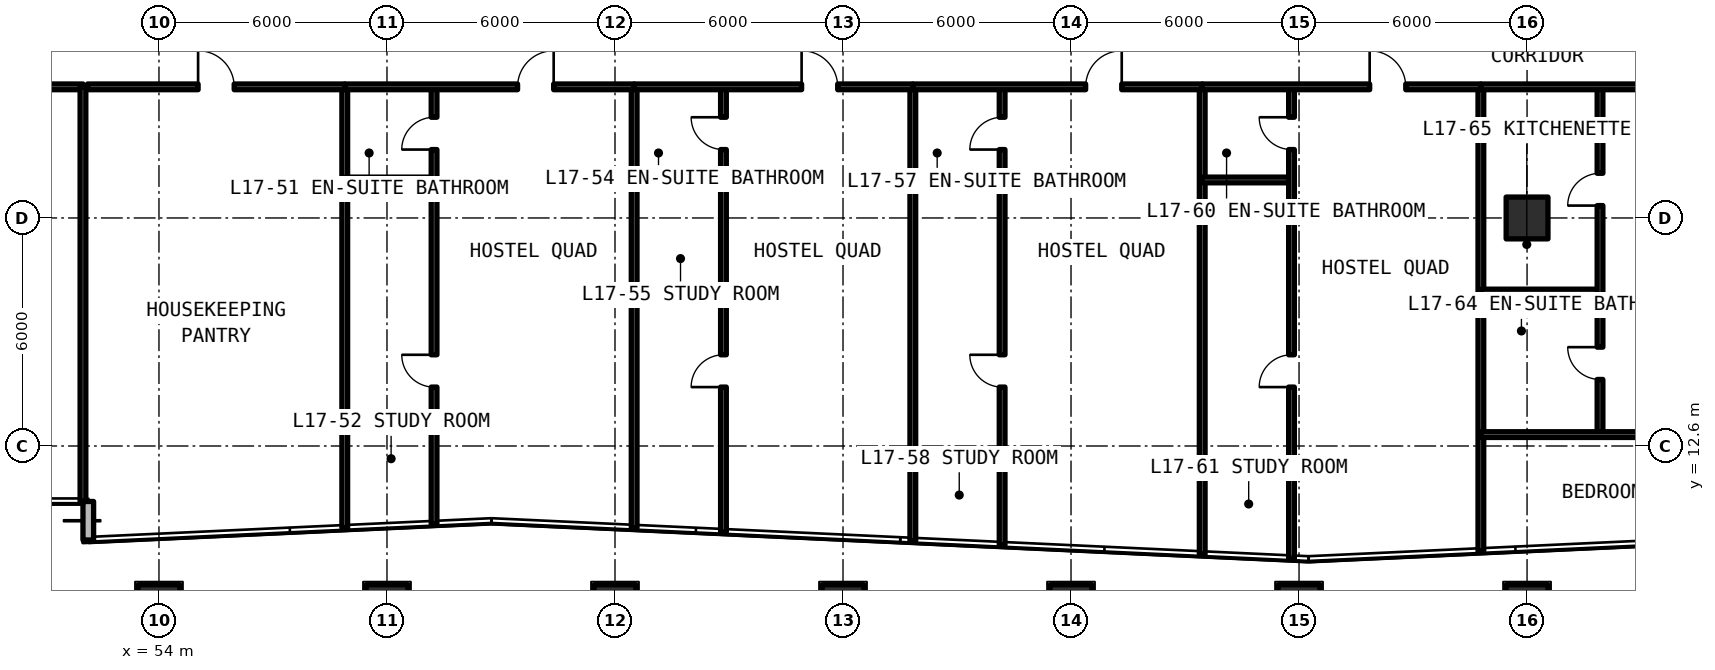
"""IFC4 building model, lengths in metres.
Left out: names, types, materials, properties, quantities, classifications, styles, units other than length and angle.
Written with IfcOpenShell. Run it as: python <this file> out.ifc"""

import sys

from ifc_helpers import new_model, si_unit, direction, frame, frame_2d, origin, origin_2d, place, context, subcontext, project, spatial, rectangle, extrude, element, fill, save


model = new_model("IFC4")
c1 = context("Model", 3, precision=1e-05, world=origin(), true_north=direction((0.0, 1.0)))
c2 = subcontext(c1, "Body", "Model", "MODEL_VIEW")
j1 = project(units=[si_unit("LENGTHUNIT", "METRE"), si_unit("PLANEANGLEUNIT", "RADIAN")], contexts=[c1])
p1 = place(None, origin())
s1 = spatial("IfcSite", under=j1, at=p1, CompositionType="ELEMENT")
p2 = place(p1, origin())
s2 = spatial("IfcBuilding", under=s1, at=p2, CompositionType="ELEMENT")
p3 = place(p2, frame((0.0, 0.0, 62.37)))
s3 = spatial("IfcBuildingStorey", under=s2, at=p3, CompositionType="ELEMENT", Elevation=62.37)
for number, where, z_axis, x_axis in (
    (1, (90.0, 18.6, 0.0), (0.0, 0.0, 1.0), (1.0, 0.0, 0.0)),
    (2, (54.0, 8.4, 0.0), (0.0, 0.0, 1.0), (1.0, 0.0, 0.0)),
    (3, (60.0, 8.4, 0.0), (0.0, 0.0, 1.0), (1.0, 0.0, 0.0)),
    (4, (66.0, 8.4, 0.0), (0.0, 0.0, 1.0), (1.0, 0.0, 0.0)),
    (5, (72.0, 8.4, 0.0), (0.0, 0.0, 1.0), (1.0, 0.0, 0.0)),
    (6, (78.0, 8.4, 0.0), (0.0, 0.0, 1.0), (1.0, 0.0, 0.0)),
    (7, (84.0, 8.4, 0.0), (0.0, 0.0, 1.0), (1.0, 0.0, 0.0)),
    (8, (90.0, 8.4, 0.0), (0.0, 0.0, 1.0), (1.0, 0.0, 0.0)),
):
    element("IfcColumn", number, at=place(p3, frame(where, z_axis=z_axis, x_axis=x_axis)), inside=s3, PredefinedType="COLUMN", context=c2, shape_type="SweptSolid", body=[
        extrude(rectangle(XDim=1.1, YDim=1.1, at=origin_2d()), origin(), (0.0, 0.0, 1.0), 3.63),
    ])
p4 = place(p3, frame((52.14, 11.14, 0.0), z_axis=(0.0, 0.0, 1.0), x_axis=(0.0, -1.0, 0.0)))
e9 = element("IfcWall", 9, at=p4, inside=s3, PredefinedType="SOLIDWALL", context=c2, shape_type="SweptSolid", body=[
    extrude(rectangle(XDim=1.013, YDim=0.28, at=frame_2d((0.507, 0.0))), origin(), (0.0, 0.0, 1.0), 3.41),
])
p5 = place(p3, frame((43.6, 22.05, 0.0), z_axis=(0.0, 0.0, 1.0), x_axis=(1.0, 0.0, 0.0)))
e10 = element("IfcWall", 10, at=p5, inside=s3, PredefinedType="SOLIDWALL", context=c2, shape_type="SweptSolid", body=[
    extrude(rectangle(XDim=8.4, YDim=0.15, at=frame_2d((4.2, 0.0))), origin(), (0.0, 0.0, 1.0), 2.63),
])
p6 = place(p5, frame((3.65, 0.0, 0.0)))
e11 = element("IfcOpeningElement", 11, at=p6, cuts=e10, PredefinedType="OPENING", context=c2, shape_type="SweptSolid", body=[
    extrude(rectangle(XDim=1.1, YDim=2.15, at=frame_2d((0.55, 1.075))), frame((0.0, 0.085, 0.0), z_axis=(0.0, -1.0, 0.0), x_axis=(1.0, 0.0, 0.0)), (0.0, 0.0, 1.0), 0.17),
])
p7 = place(p3, frame((52.0, 11.14, 0.0), z_axis=(0.0, 0.0, 1.0), x_axis=(0.0, 1.0, 0.0)))
e12 = element("IfcWall", 12, at=p7, inside=s3, PredefinedType="SOLIDWALL", context=c2, shape_type="SweptSolid", body=[
    extrude(rectangle(XDim=10.91, YDim=0.15, at=frame_2d((5.455, 0.0))), origin(), (0.0, 0.0, 1.0), 2.63),
])
p8 = place(p3, frame((58.889, 10.441, 0.0), z_axis=(0.0, 0.0, 1.0), x_axis=(0.0, 1.0, 0.0)))
e13 = element("IfcWall", 13, at=p8, inside=s3, PredefinedType="SOLIDWALL", context=c2, shape_type="SweptSolid", body=[
    extrude(rectangle(XDim=11.609, YDim=0.15, at=frame_2d((5.805, 0.0))), origin(), (0.0, 0.0, 1.0), 2.63),
])
p9 = place(p3, frame((52.12, 22.05, 0.0), z_axis=(0.0, 0.0, 1.0), x_axis=(1.0, 0.0, 0.0)))
e14 = element("IfcWall", 14, at=p9, inside=s3, PredefinedType="SOLIDWALL", context=c2, shape_type="SweptSolid", body=[
    extrude(rectangle(XDim=6.769, YDim=0.15, at=frame_2d((3.384, 0.0))), origin(), (0.0, 0.0, 1.0), 2.63),
])
p10 = place(p9, frame((2.909, 0.0, 0.0)))
e15 = element("IfcOpeningElement", 15, at=p10, cuts=e14, PredefinedType="OPENING", context=c2, shape_type="SweptSolid", body=[
    extrude(rectangle(XDim=0.95, YDim=2.15, at=frame_2d((0.475, 1.075))), frame((0.0, 0.085, 0.0), z_axis=(0.0, -1.0, 0.0), x_axis=(1.0, 0.0, 0.0)), (0.0, 0.0, 1.0), 0.17),
])
p11 = place(p3, frame((66.504, 10.446, 0.0), z_axis=(0.0, 0.0, 1.0), x_axis=(0.0, 1.0, 0.0)))
e16 = element("IfcWall", 16, at=p11, inside=s3, PredefinedType="SOLIDWALL", context=c2, shape_type="SweptSolid", body=[
    extrude(rectangle(XDim=11.604, YDim=0.15, at=frame_2d((5.802, 0.0))), origin(), (0.0, 0.0, 1.0), 2.63),
])
p12 = place(p3, frame((58.889, 19.6, 0.0), z_axis=(0.0, 0.0, 1.0), x_axis=(1.0, 0.0, 0.0)))
e17 = element("IfcWall", 17, at=p12, inside=s3, PredefinedType="PARTITIONING", context=c2, shape_type="SweptSolid", body=[
    extrude(rectangle(XDim=2.35, YDim=0.15, at=frame_2d((1.175, 0.0))), origin(), (0.0, 0.0, 1.0), 2.63),
])
p13 = place(p3, frame((61.239, 10.55, 0.0), z_axis=(0.0, 0.0, 1.0), x_axis=(0.0, 1.0, 0.0)))
e18 = element("IfcWall", 18, at=p13, inside=s3, PredefinedType="PARTITIONING", context=c2, shape_type="SweptSolid", body=[
    extrude(rectangle(XDim=11.5, YDim=0.15, at=frame_2d((5.75, 0.0))), origin(), (0.0, 0.0, 1.0), 2.63),
])
p14 = place(p13, frame((3.6, 0.0, 0.0)))
e19 = element("IfcOpeningElement", 19, at=p14, cuts=e18, PredefinedType="OPENING", context=c2, shape_type="SweptSolid", body=[
    extrude(rectangle(XDim=0.85, YDim=2.1, at=frame_2d((0.425, 1.05))), frame((0.0, 0.085, 0.0), z_axis=(0.0, -1.0, 0.0), x_axis=(1.0, 0.0, 0.0)), (0.0, 0.0, 1.0), 0.17),
])
p15 = place(p13, frame((9.85, 0.0, 0.0)))
e20 = element("IfcOpeningElement", 20, at=p15, cuts=e18, PredefinedType="OPENING", context=c2, shape_type="SweptSolid", body=[
    extrude(rectangle(XDim=0.85, YDim=2.1, at=frame_2d((0.425, 1.05))), frame((0.0, 0.085, 0.0), z_axis=(0.0, -1.0, 0.0), x_axis=(1.0, 0.0, 0.0)), (0.0, 0.0, 1.0), 0.17),
])
p16 = place(p3, frame((58.889, 22.05, 0.0), z_axis=(0.0, 0.0, 1.0), x_axis=(1.0, 0.0, 0.0)))
e21 = element("IfcWall", 21, at=p16, inside=s3, PredefinedType="SOLIDWALL", context=c2, shape_type="SweptSolid", body=[
    extrude(rectangle(XDim=7.615, YDim=0.15, at=frame_2d((3.808, 0.0))), origin(), (0.0, 0.0, 1.0), 2.63),
])
p17 = place(p16, frame((4.548, 0.0, 0.0)))
e22 = element("IfcOpeningElement", 22, at=p17, cuts=e21, PredefinedType="OPENING", context=c2, shape_type="SweptSolid", body=[
    extrude(rectangle(XDim=0.95, YDim=2.15, at=frame_2d((0.475, 1.075))), frame((0.0, 0.085, 0.0), z_axis=(0.0, -1.0, 0.0), x_axis=(1.0, 0.0, 0.0)), (0.0, 0.0, 1.0), 0.17),
])
p18 = place(p3, frame((73.837, 10.104, 0.0), z_axis=(0.0, 0.0, 1.0), x_axis=(0.0, 1.0, 0.0)))
e23 = element("IfcWall", 23, at=p18, inside=s3, PredefinedType="SOLIDWALL", context=c2, shape_type="SweptSolid", body=[
    extrude(rectangle(XDim=11.946, YDim=0.15, at=frame_2d((5.973, 0.0))), origin(), (0.0, 0.0, 1.0), 2.63),
])
p19 = place(p3, frame((66.504, 19.6, 0.0), z_axis=(0.0, 0.0, 1.0), x_axis=(1.0, 0.0, 0.0)))
e24 = element("IfcWall", 24, at=p19, inside=s3, PredefinedType="PARTITIONING", context=c2, shape_type="SweptSolid", body=[
    extrude(rectangle(XDim=2.35, YDim=0.15, at=frame_2d((1.175, 0.0))), origin(), (0.0, 0.0, 1.0), 2.63),
])
p20 = place(p3, frame((68.854, 10.336, 0.0), z_axis=(0.0, 0.0, 1.0), x_axis=(0.0, 1.0, 0.0)))
e25 = element("IfcWall", 25, at=p20, inside=s3, PredefinedType="PARTITIONING", context=c2, shape_type="SweptSolid", body=[
    extrude(rectangle(XDim=11.714, YDim=0.15, at=frame_2d((5.857, 0.0))), origin(), (0.0, 0.0, 1.0), 2.63),
])
p21 = place(p20, frame((3.814, 0.0, 0.0)))
e26 = element("IfcOpeningElement", 26, at=p21, cuts=e25, PredefinedType="OPENING", context=c2, shape_type="SweptSolid", body=[
    extrude(rectangle(XDim=0.85, YDim=2.1, at=frame_2d((0.425, 1.05))), frame((0.0, 0.085, 0.0), z_axis=(0.0, -1.0, 0.0), x_axis=(1.0, 0.0, 0.0)), (0.0, 0.0, 1.0), 0.17),
])
p22 = place(p20, frame((10.064, 0.0, 0.0)))
e27 = element("IfcOpeningElement", 27, at=p22, cuts=e25, PredefinedType="OPENING", context=c2, shape_type="SweptSolid", body=[
    extrude(rectangle(XDim=0.85, YDim=2.1, at=frame_2d((0.425, 1.05))), frame((0.0, 0.085, 0.0), z_axis=(0.0, -1.0, 0.0), x_axis=(1.0, 0.0, 0.0)), (0.0, 0.0, 1.0), 0.17),
])
p23 = place(p3, frame((66.504, 22.05, 0.0), z_axis=(0.0, 0.0, 1.0), x_axis=(1.0, 0.0, 0.0)))
e28 = element("IfcWall", 28, at=p23, inside=s3, PredefinedType="SOLIDWALL", context=c2, shape_type="SweptSolid", body=[
    extrude(rectangle(XDim=7.333, YDim=0.15, at=frame_2d((3.667, 0.0))), origin(), (0.0, 0.0, 1.0), 2.63),
])
p24 = place(p23, frame((4.406, 0.0, 0.0)))
e29 = element("IfcOpeningElement", 29, at=p24, cuts=e28, PredefinedType="OPENING", context=c2, shape_type="SweptSolid", body=[
    extrude(rectangle(XDim=0.95, YDim=2.15, at=frame_2d((0.475, 1.075))), frame((0.0, 0.085, 0.0), z_axis=(0.0, -1.0, 0.0), x_axis=(1.0, 0.0, 0.0)), (0.0, 0.0, 1.0), 0.17),
])
p25 = place(p3, frame((81.452, 9.75, 0.0), z_axis=(0.0, 0.0, 1.0), x_axis=(0.0, 1.0, 0.0)))
e30 = element("IfcWall", 30, at=p25, inside=s3, PredefinedType="SOLIDWALL", context=c2, shape_type="SweptSolid", body=[
    extrude(rectangle(XDim=12.3, YDim=0.15, at=frame_2d((6.15, 0.0))), origin(), (0.0, 0.0, 1.0), 2.63),
])
p26 = place(p3, frame((73.837, 19.6, 0.0), z_axis=(0.0, 0.0, 1.0), x_axis=(1.0, 0.0, 0.0)))
e31 = element("IfcWall", 31, at=p26, inside=s3, PredefinedType="PARTITIONING", context=c2, shape_type="SweptSolid", body=[
    extrude(rectangle(XDim=2.35, YDim=0.15, at=frame_2d((1.175, 0.0))), origin(), (0.0, 0.0, 1.0), 2.63),
])
p27 = place(p3, frame((76.187, 9.995, 0.0), z_axis=(0.0, 0.0, 1.0), x_axis=(0.0, 1.0, 0.0)))
e32 = element("IfcWall", 32, at=p27, inside=s3, PredefinedType="PARTITIONING", context=c2, shape_type="SweptSolid", body=[
    extrude(rectangle(XDim=12.055, YDim=0.15, at=frame_2d((6.027, 0.0))), origin(), (0.0, 0.0, 1.0), 2.63),
])
p28 = place(p27, frame((4.155, 0.0, 0.0)))
e33 = element("IfcOpeningElement", 33, at=p28, cuts=e32, PredefinedType="OPENING", context=c2, shape_type="SweptSolid", body=[
    extrude(rectangle(XDim=0.85, YDim=2.1, at=frame_2d((0.425, 1.05))), frame((0.0, 0.085, 0.0), z_axis=(0.0, -1.0, 0.0), x_axis=(1.0, 0.0, 0.0)), (0.0, 0.0, 1.0), 0.17),
])
p29 = place(p27, frame((10.405, 0.0, 0.0)))
e34 = element("IfcOpeningElement", 34, at=p29, cuts=e32, PredefinedType="OPENING", context=c2, shape_type="SweptSolid", body=[
    extrude(rectangle(XDim=0.85, YDim=2.1, at=frame_2d((0.425, 1.05))), frame((0.0, 0.085, 0.0), z_axis=(0.0, -1.0, 0.0), x_axis=(1.0, 0.0, 0.0)), (0.0, 0.0, 1.0), 0.17),
])
p30 = place(p3, frame((73.837, 22.05, 0.0), z_axis=(0.0, 0.0, 1.0), x_axis=(1.0, 0.0, 0.0)))
e35 = element("IfcWall", 35, at=p30, inside=s3, PredefinedType="SOLIDWALL", context=c2, shape_type="SweptSolid", body=[
    extrude(rectangle(XDim=7.615, YDim=0.15, at=frame_2d((3.808, 0.0))), origin(), (0.0, 0.0, 1.0), 2.63),
])
p31 = place(p30, frame((4.548, 0.0, 0.0)))
e36 = element("IfcOpeningElement", 36, at=p31, cuts=e35, PredefinedType="OPENING", context=c2, shape_type="SweptSolid", body=[
    extrude(rectangle(XDim=0.95, YDim=2.15, at=frame_2d((0.475, 1.075))), frame((0.0, 0.085, 0.0), z_axis=(0.0, -1.0, 0.0), x_axis=(1.0, 0.0, 0.0)), (0.0, 0.0, 1.0), 0.17),
])
p32 = place(p3, frame((88.785, 9.831, 0.0), z_axis=(0.0, 0.0, 1.0), x_axis=(0.0, 1.0, 0.0)))
e37 = element("IfcWall", 37, at=p32, inside=s3, PredefinedType="SOLIDWALL", context=c2, shape_type="SweptSolid", body=[
    extrude(rectangle(XDim=12.219, YDim=0.15, at=frame_2d((6.109, 0.0))), origin(), (0.0, 0.0, 1.0), 2.63),
])
p33 = place(p3, frame((81.452, 19.6, 0.0), z_axis=(0.0, 0.0, 1.0), x_axis=(1.0, 0.0, 0.0)))
e38 = element("IfcWall", 38, at=p33, inside=s3, PredefinedType="PARTITIONING", context=c2, shape_type="SweptSolid", body=[
    extrude(rectangle(XDim=2.35, YDim=0.15, at=frame_2d((1.175, 0.0))), origin(), (0.0, 0.0, 1.0), 2.63),
])
p34 = place(p3, frame((83.802, 9.641, 0.0), z_axis=(0.0, 0.0, 1.0), x_axis=(0.0, 1.0, 0.0)))
e39 = element("IfcWall", 39, at=p34, inside=s3, PredefinedType="PARTITIONING", context=c2, shape_type="SweptSolid", body=[
    extrude(rectangle(XDim=12.409, YDim=0.15, at=frame_2d((6.205, 0.0))), origin(), (0.0, 0.0, 1.0), 2.63),
])
p35 = place(p34, frame((4.509, 0.0, 0.0)))
e40 = element("IfcOpeningElement", 40, at=p35, cuts=e39, PredefinedType="OPENING", context=c2, shape_type="SweptSolid", body=[
    extrude(rectangle(XDim=0.85, YDim=2.1, at=frame_2d((0.425, 1.05))), frame((0.0, 0.085, 0.0), z_axis=(0.0, -1.0, 0.0), x_axis=(1.0, 0.0, 0.0)), (0.0, 0.0, 1.0), 0.17),
])
p36 = place(p34, frame((10.759, 0.0, 0.0)))
e41 = element("IfcOpeningElement", 41, at=p36, cuts=e39, PredefinedType="OPENING", context=c2, shape_type="SweptSolid", body=[
    extrude(rectangle(XDim=0.85, YDim=2.1, at=frame_2d((0.425, 1.05))), frame((0.0, 0.085, 0.0), z_axis=(0.0, -1.0, 0.0), x_axis=(1.0, 0.0, 0.0)), (0.0, 0.0, 1.0), 0.17),
])
p37 = place(p3, frame((81.452, 22.05, 0.0), z_axis=(0.0, 0.0, 1.0), x_axis=(1.0, 0.0, 0.0)))
e42 = element("IfcWall", 42, at=p37, inside=s3, PredefinedType="SOLIDWALL", context=c2, shape_type="SweptSolid", body=[
    extrude(rectangle(XDim=7.333, YDim=0.15, at=frame_2d((3.667, 0.0))), origin(), (0.0, 0.0, 1.0), 2.63),
])
p38 = place(p37, frame((4.406, 0.0, 0.0)))
e43 = element("IfcOpeningElement", 43, at=p38, cuts=e42, PredefinedType="OPENING", context=c2, shape_type="SweptSolid", body=[
    extrude(rectangle(XDim=0.95, YDim=2.15, at=frame_2d((0.475, 1.075))), frame((0.0, 0.085, 0.0), z_axis=(0.0, -1.0, 0.0), x_axis=(1.0, 0.0, 0.0)), (0.0, 0.0, 1.0), 0.17),
])
p39 = place(p3, frame((88.785, 16.652, 0.0), z_axis=(0.0, 0.0, 1.0), x_axis=(1.0, 0.0, 0.0)))
e44 = element("IfcWall", 44, at=p39, inside=s3, PredefinedType="PARTITIONING", context=c2, shape_type="SweptSolid", body=[
    extrude(rectangle(XDim=3.135, YDim=0.15, at=frame_2d((1.567, 0.0))), origin(), (0.0, 0.0, 1.0), 2.63),
])
p40 = place(p3, frame((91.92, 12.9, 0.0), z_axis=(0.0, 0.0, 1.0), x_axis=(0.0, 1.0, 0.0)))
e45 = element("IfcWall", 45, at=p40, inside=s3, PredefinedType="PARTITIONING", context=c2, shape_type="SweptSolid", body=[
    extrude(rectangle(XDim=9.15, YDim=0.15, at=frame_2d((4.575, 0.0))), origin(), (0.0, 0.0, 1.0), 2.63),
])
p41 = place(p40, frame((1.451, 0.0, 0.0)))
e46 = element("IfcOpeningElement", 46, at=p41, cuts=e45, PredefinedType="OPENING", context=c2, shape_type="SweptSolid", body=[
    extrude(rectangle(XDim=0.85, YDim=2.1, at=frame_2d((0.425, 1.05))), frame((0.0, 0.085, 0.0), z_axis=(0.0, -1.0, 0.0), x_axis=(1.0, 0.0, 0.0)), (0.0, 0.0, 1.0), 0.17),
])
p42 = place(p40, frame((6.026, 0.0, 0.0)))
e47 = element("IfcOpeningElement", 47, at=p42, cuts=e45, PredefinedType="OPENING", context=c2, shape_type="SweptSolid", body=[
    extrude(rectangle(XDim=0.85, YDim=2.1, at=frame_2d((0.425, 1.05))), frame((0.0, 0.085, 0.0), z_axis=(0.0, -1.0, 0.0), x_axis=(1.0, 0.0, 0.0)), (0.0, 0.0, 1.0), 0.17),
])
p43 = place(p3, frame((88.785, 12.9, 0.0), z_axis=(0.0, 0.0, 1.0), x_axis=(1.0, 0.0, 0.0)))
e48 = element("IfcWall", 48, at=p43, inside=s3, PredefinedType="PARTITIONING", context=c2, shape_type="SweptSolid", body=[
    extrude(rectangle(XDim=7.615, YDim=0.15, at=frame_2d((3.808, 0.0))), origin(), (0.0, 0.0, 1.0), 2.63),
])
p44 = place(p43, frame((4.99, 0.0, 0.0)))
e49 = element("IfcOpeningElement", 49, at=p44, cuts=e48, PredefinedType="OPENING", context=c2, shape_type="SweptSolid", body=[
    extrude(rectangle(XDim=0.85, YDim=2.1, at=frame_2d((0.425, 1.05))), frame((0.0, 0.085, 0.0), z_axis=(0.0, -1.0, 0.0), x_axis=(1.0, 0.0, 0.0)), (0.0, 0.0, 1.0), 0.17),
])
p45 = place(p3, frame((88.785, 22.05, 0.0), z_axis=(0.0, 0.0, 1.0), x_axis=(1.0, 0.0, 0.0)))
e50 = element("IfcWall", 50, at=p45, inside=s3, PredefinedType="SOLIDWALL", context=c2, shape_type="SweptSolid", body=[
    extrude(rectangle(XDim=7.615, YDim=0.15, at=frame_2d((3.808, 0.0))), origin(), (0.0, 0.0, 1.0), 2.63),
])
p46 = place(p45, frame((4.94, 0.0, 0.0)))
e51 = element("IfcOpeningElement", 51, at=p46, cuts=e50, PredefinedType="OPENING", context=c2, shape_type="SweptSolid", body=[
    extrude(rectangle(XDim=0.95, YDim=2.15, at=frame_2d((0.475, 1.075))), frame((0.0, 0.085, 0.0), z_axis=(0.0, -1.0, 0.0), x_axis=(1.0, 0.0, 0.0)), (0.0, 0.0, 1.0), 0.17),
])
p47 = place(p10, origin())
e52 = element("IfcDoor", 52, at=p47, inside=s3, OperationType="SINGLE_SWING_LEFT", PredefinedType="DOOR", context=c2, shape_type="SweptSolid", body=[
    extrude(rectangle(XDim=0.95, YDim=2.15, at=frame_2d((0.475, 1.075))), frame((0.0, 0.025, 0.0), z_axis=(0.0, -1.0, 0.0), x_axis=(1.0, 0.0, 0.0)), (0.0, 0.0, 1.0), 0.05),
])
fill(e15, e52)
p48 = place(p14, origin())
e53 = element("IfcDoor", 53, at=p48, inside=s3, OperationType="SINGLE_SWING_RIGHT", PredefinedType="DOOR", context=c2, shape_type="SweptSolid", body=[
    extrude(rectangle(XDim=0.85, YDim=2.1, at=frame_2d((0.425, 1.05))), frame((0.0, 0.025, 0.0), z_axis=(0.0, -1.0, 0.0), x_axis=(1.0, 0.0, 0.0)), (0.0, 0.0, 1.0), 0.05),
])
fill(e19, e53)
p49 = place(p15, origin())
e54 = element("IfcDoor", 54, at=p49, inside=s3, OperationType="SINGLE_SWING_LEFT", PredefinedType="DOOR", context=c2, shape_type="SweptSolid", body=[
    extrude(rectangle(XDim=0.85, YDim=2.1, at=frame_2d((0.425, 1.05))), frame((0.0, 0.025, 0.0), z_axis=(0.0, -1.0, 0.0), x_axis=(1.0, 0.0, 0.0)), (0.0, 0.0, 1.0), 0.05),
])
fill(e20, e54)
p50 = place(p17, origin())
e55 = element("IfcDoor", 55, at=p50, inside=s3, OperationType="SINGLE_SWING_RIGHT", PredefinedType="DOOR", context=c2, shape_type="SweptSolid", body=[
    extrude(rectangle(XDim=0.95, YDim=2.15, at=frame_2d((0.475, 1.075))), frame((0.0, 0.025, 0.0), z_axis=(0.0, -1.0, 0.0), x_axis=(1.0, 0.0, 0.0)), (0.0, 0.0, 1.0), 0.05),
])
fill(e22, e55)
p51 = place(p21, origin())
e56 = element("IfcDoor", 56, at=p51, inside=s3, OperationType="SINGLE_SWING_LEFT", PredefinedType="DOOR", context=c2, shape_type="SweptSolid", body=[
    extrude(rectangle(XDim=0.85, YDim=2.1, at=frame_2d((0.425, 1.05))), frame((0.0, 0.025, 0.0), z_axis=(0.0, -1.0, 0.0), x_axis=(1.0, 0.0, 0.0)), (0.0, 0.0, 1.0), 0.05),
])
fill(e26, e56)
p52 = place(p22, origin())
e57 = element("IfcDoor", 57, at=p52, inside=s3, OperationType="SINGLE_SWING_RIGHT", PredefinedType="DOOR", context=c2, shape_type="SweptSolid", body=[
    extrude(rectangle(XDim=0.85, YDim=2.1, at=frame_2d((0.425, 1.05))), frame((0.0, 0.025, 0.0), z_axis=(0.0, -1.0, 0.0), x_axis=(1.0, 0.0, 0.0)), (0.0, 0.0, 1.0), 0.05),
])
fill(e27, e57)
p53 = place(p24, origin())
e58 = element("IfcDoor", 58, at=p53, inside=s3, OperationType="SINGLE_SWING_LEFT", PredefinedType="DOOR", context=c2, shape_type="SweptSolid", body=[
    extrude(rectangle(XDim=0.95, YDim=2.15, at=frame_2d((0.475, 1.075))), frame((0.0, 0.025, 0.0), z_axis=(0.0, -1.0, 0.0), x_axis=(1.0, 0.0, 0.0)), (0.0, 0.0, 1.0), 0.05),
])
fill(e29, e58)
p54 = place(p28, origin())
e59 = element("IfcDoor", 59, at=p54, inside=s3, OperationType="SINGLE_SWING_RIGHT", PredefinedType="DOOR", context=c2, shape_type="SweptSolid", body=[
    extrude(rectangle(XDim=0.85, YDim=2.1, at=frame_2d((0.425, 1.05))), frame((0.0, 0.025, 0.0), z_axis=(0.0, -1.0, 0.0), x_axis=(1.0, 0.0, 0.0)), (0.0, 0.0, 1.0), 0.05),
])
fill(e33, e59)
p55 = place(p29, origin())
e60 = element("IfcDoor", 60, at=p55, inside=s3, OperationType="SINGLE_SWING_LEFT", PredefinedType="DOOR", context=c2, shape_type="SweptSolid", body=[
    extrude(rectangle(XDim=0.85, YDim=2.1, at=frame_2d((0.425, 1.05))), frame((0.0, 0.025, 0.0), z_axis=(0.0, -1.0, 0.0), x_axis=(1.0, 0.0, 0.0)), (0.0, 0.0, 1.0), 0.05),
])
fill(e34, e60)
p56 = place(p31, origin())
e61 = element("IfcDoor", 61, at=p56, inside=s3, OperationType="SINGLE_SWING_RIGHT", PredefinedType="DOOR", context=c2, shape_type="SweptSolid", body=[
    extrude(rectangle(XDim=0.95, YDim=2.15, at=frame_2d((0.475, 1.075))), frame((0.0, 0.025, 0.0), z_axis=(0.0, -1.0, 0.0), x_axis=(1.0, 0.0, 0.0)), (0.0, 0.0, 1.0), 0.05),
])
fill(e36, e61)
p57 = place(p35, origin())
e62 = element("IfcDoor", 62, at=p57, inside=s3, OperationType="SINGLE_SWING_LEFT", PredefinedType="DOOR", context=c2, shape_type="SweptSolid", body=[
    extrude(rectangle(XDim=0.85, YDim=2.1, at=frame_2d((0.425, 1.05))), frame((0.0, 0.025, 0.0), z_axis=(0.0, -1.0, 0.0), x_axis=(1.0, 0.0, 0.0)), (0.0, 0.0, 1.0), 0.05),
])
fill(e40, e62)
p58 = place(p36, origin())
e63 = element("IfcDoor", 63, at=p58, inside=s3, OperationType="SINGLE_SWING_RIGHT", PredefinedType="DOOR", context=c2, shape_type="SweptSolid", body=[
    extrude(rectangle(XDim=0.85, YDim=2.1, at=frame_2d((0.425, 1.05))), frame((0.0, 0.025, 0.0), z_axis=(0.0, -1.0, 0.0), x_axis=(1.0, 0.0, 0.0)), (0.0, 0.0, 1.0), 0.05),
])
fill(e41, e63)
p59 = place(p38, origin())
e64 = element("IfcDoor", 64, at=p59, inside=s3, OperationType="SINGLE_SWING_LEFT", PredefinedType="DOOR", context=c2, shape_type="SweptSolid", body=[
    extrude(rectangle(XDim=0.95, YDim=2.15, at=frame_2d((0.475, 1.075))), frame((0.0, 0.025, 0.0), z_axis=(0.0, -1.0, 0.0), x_axis=(1.0, 0.0, 0.0)), (0.0, 0.0, 1.0), 0.05),
])
fill(e43, e64)
p60 = place(p41, origin())
e65 = element("IfcDoor", 65, at=p60, inside=s3, OperationType="SINGLE_SWING_RIGHT", PredefinedType="DOOR", context=c2, shape_type="SweptSolid", body=[
    extrude(rectangle(XDim=0.85, YDim=2.1, at=frame_2d((0.425, 1.05))), frame((0.0, 0.025, 0.0), z_axis=(0.0, -1.0, 0.0), x_axis=(1.0, 0.0, 0.0)), (0.0, 0.0, 1.0), 0.05),
])
fill(e46, e65)
p61 = place(p42, origin())
e66 = element("IfcDoor", 66, at=p61, inside=s3, OperationType="SINGLE_SWING_LEFT", PredefinedType="DOOR", context=c2, shape_type="SweptSolid", body=[
    extrude(rectangle(XDim=0.85, YDim=2.1, at=frame_2d((0.425, 1.05))), frame((0.0, 0.025, 0.0), z_axis=(0.0, -1.0, 0.0), x_axis=(1.0, 0.0, 0.0)), (0.0, 0.0, 1.0), 0.05),
])
fill(e47, e66)
save(model, sys.argv[1])
